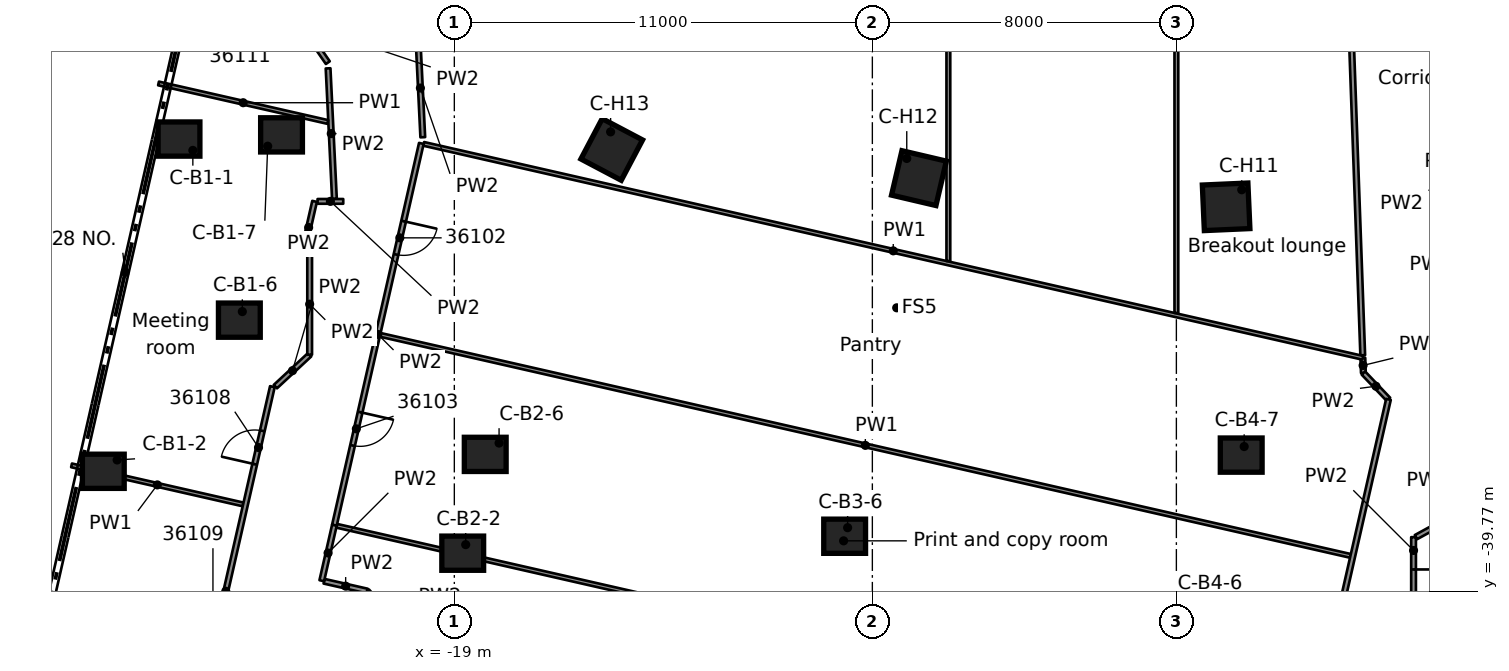
"""IFC4 building model, lengths in metres.
Left out: names, types, materials, properties, quantities, classifications, styles, units other than length and angle.
Written with IfcOpenShell. Run it as: python <this file> out.ifc"""

import sys

from ifc_helpers import new_model, si_unit, direction, frame, frame_2d, origin, origin_2d, place, context, subcontext, project, spatial, rectangle, extrude, element, fill, save


model = new_model("IFC4")
c1 = context("Model", 3, precision=1e-05, world=origin(), true_north=direction((0.0, 1.0)))
c2 = subcontext(c1, "Body", "Model", "MODEL_VIEW")
j1 = project(units=[si_unit("LENGTHUNIT", "METRE"), si_unit("PLANEANGLEUNIT", "RADIAN")], contexts=[c1])
p1 = place(None, origin())
s1 = spatial("IfcSite", under=j1, at=p1, CompositionType="ELEMENT")
p2 = place(p1, origin())
s2 = spatial("IfcBuilding", under=s1, at=p2, CompositionType="ELEMENT")
p3 = place(p2, frame((0.0, 0.0, 181.1)))
s3 = spatial("IfcBuildingStorey", under=s2, at=p3, CompositionType="ELEMENT", Elevation=181.1)
for number, where, z_axis, x_axis in (
    (1, (-26.245, -27.867, 0.0), (0.0, 0.0, 1.0), (1.0, 0.0, 0.0)),
    (2, (-28.237, -36.609, 0.0), (0.0, 0.0, 1.0), (1.0, 0.0, 0.0)),
    (3, (-24.657, -32.632, 0.0), (0.0, 0.0, 1.0), (1.0, 0.0, 0.0)),
    (4, (-23.547, -27.757, 0.0), (0.0, 0.0, 1.0), (1.0, 0.0, 0.0)),
    (5, (-18.779, -38.764, 0.0), (0.0, 0.0, 1.0), (1.0, 0.0, 0.0)),
    (6, (-18.187, -36.164, 0.0), (0.0, 0.0, 1.0), (1.0, 0.0, 0.0)),
    (7, (-8.729, -38.318, 0.0), (0.0, 0.0, 1.0), (1.0, 0.0, 0.0)),
    (8, (1.706, -36.183, 0.0), (0.0, 0.0, 1.0), (1.0, 0.0, 0.0)),
):
    element("IfcColumn", number, at=place(p3, frame(where, z_axis=z_axis, x_axis=x_axis)), inside=s3, PredefinedType="COLUMN", context=c2, shape_type="SweptSolid", body=[
        extrude(rectangle(XDim=1.1, YDim=0.9, at=origin_2d()), origin(), (0.0, 0.0, 1.0), 3.5),
    ])
for number, where, z_axis, x_axis in (
    (9, (1.309, -29.65, 0.0), (0.0, 0.0, 1.0), (0.044, -0.999, 0.0)),
    (10, (-6.774, -28.895, 0.0), (0.0, 0.0, 1.0), (-0.228, -0.974, 0.0)),
    (11, (-14.858, -28.141, 0.0), (0.0, 0.0, 1.0), (-0.467, -0.884, 0.0)),
):
    element("IfcColumn", number, at=place(p3, frame(where, z_axis=z_axis, x_axis=x_axis)), inside=s3, PredefinedType="COLUMN", context=c2, shape_type="SweptSolid", body=[
        extrude(rectangle(XDim=1.2, YDim=1.2, at=origin_2d()), origin(), (0.0, 0.0, 1.0), 3.5),
    ])
p4 = place(p3, frame((4.907, -33.623, 0.0), z_axis=(0.0, 0.0, 1.0), x_axis=(0.034692866757, -0.999398021309, 0.0)))
e12 = element("IfcWall", 12, at=p4, inside=s3, PredefinedType="PARTITIONING", context=c2, shape_type="SweptSolid", body=[
    extrude(rectangle(XDim=0.401, YDim=0.125, at=frame_2d((0.201, 0.0))), origin(), (0.0, 0.0, 1.0), 3.06),
])
p5 = place(p3, frame((4.904, -33.555, 0.0), z_axis=(0.0, 0.0, 1.0), x_axis=(-0.035916720211, 0.999354786454, 0.0)))
e13 = element("IfcWall", 13, at=p5, inside=s3, PredefinedType="PARTITIONING", context=c2, shape_type="SweptSolid", body=[
    extrude(rectangle(XDim=17.904, YDim=0.125, at=frame_2d((8.952, 0.0))), origin(), (0.0, 0.0, 1.0), 2.425),
])
p6 = place(p5, frame((10.623, 0.0, 0.0)))
e14 = element("IfcOpeningElement", 14, at=p6, cuts=e13, PredefinedType="OPENING", context=c2, shape_type="SweptSolid", body=[
    extrude(rectangle(XDim=1.1, YDim=2.1, at=frame_2d((0.55, 1.05))), frame((0.0, 0.073, 0.0), z_axis=(0.0, -1.0, 0.0), x_axis=(1.0, 0.0, 0.0)), (0.0, 0.0, 1.0), 0.145),
])
p7 = place(p3, frame((-22.322, -26.007, 0.0), z_axis=(0.0, 0.0, 1.0), x_axis=(0.048573949442, -0.998819589033, 0.0)))
e15 = element("IfcWall", 15, at=p7, inside=s3, PredefinedType="PARTITIONING", context=c2, shape_type="SweptSolid", body=[
    extrude(rectangle(XDim=3.438, YDim=0.125, at=frame_2d((1.719, 0.0))), origin(), (0.0, 0.0, 1.0), 3.06),
])
p8 = place(p3, frame((-19.956, -25.231, 0.0), z_axis=(0.0, 0.0, 1.0), x_axis=(0.048617095064, -0.998817489869, 0.0)))
e16 = element("IfcWall", 16, at=p8, inside=s3, PredefinedType="PARTITIONING", context=c2, shape_type="SweptSolid", body=[
    extrude(rectangle(XDim=2.591, YDim=0.125, at=frame_2d((1.296, 0.0))), origin(), (0.0, 0.0, 1.0), 3.06),
])
p9 = place(p3, frame((-22.329, -25.857, 0.0), z_axis=(0.0, 0.0, 1.0), x_axis=(-0.567945710046, 0.823066018276, 0.0)))
e17 = element("IfcWall", 17, at=p9, inside=s3, PredefinedType="PARTITIONING", context=c2, shape_type="SweptSolid", body=[
    extrude(rectangle(XDim=4.21, YDim=0.125, at=frame_2d((2.105, 0.0))), origin(), (0.0, 0.0, 1.0), 3.06),
])
p10 = place(p9, frame((1.85, 0.0, 0.0)))
e18 = element("IfcOpeningElement", 18, at=p10, cuts=e17, PredefinedType="OPENING", context=c2, shape_type="SweptSolid", body=[
    extrude(rectangle(XDim=0.9, YDim=2.1, at=frame_2d((0.45, 1.05))), frame((0.0, 0.073, 0.0), z_axis=(0.0, -1.0, 0.0), x_axis=(1.0, 0.0, 0.0)), (0.0, 0.0, 1.0), 0.145),
])
p11 = place(p3, frame((-22.427, -39.502, 0.0), z_axis=(0.0, 0.0, 1.0), x_axis=(0.97511430892, -0.221702694026, 0.0)))
e19 = element("IfcWall", 19, at=p11, inside=s3, PredefinedType="PARTITIONING", context=c2, shape_type="SweptSolid", body=[
    extrude(rectangle(XDim=1.164, YDim=0.125, at=frame_2d((0.582, 0.0))), origin(), (0.0, 0.0, 1.0), 3.06),
])
p12 = place(p3, frame((-29.073, -36.453, 0.0), z_axis=(0.0, 0.0, 1.0), x_axis=(0.975041099452, -0.222024445455, 0.0)))
e20 = element("IfcWall", 20, at=p12, inside=s3, PredefinedType="PARTITIONING", context=c2, shape_type="SweptSolid", body=[
    extrude(rectangle(XDim=4.63, YDim=0.1, at=frame_2d((2.315, 0.0))), origin(), (0.0, 0.0, 1.0), 3.06),
])
p13 = place(p3, frame((-22.095, -38.043, 0.0), z_axis=(0.0, 0.0, 1.0), x_axis=(0.975023843859, -0.222100211404, 0.0)))
e21 = element("IfcWall", 21, at=p13, inside=s3, PredefinedType="PARTITIONING", context=c2, shape_type="SweptSolid", body=[
    extrude(rectangle(XDim=26.186, YDim=0.1, at=frame_2d((13.093, 0.0))), origin(), (0.0, 0.0, 1.0), 2.425),
])
p14 = place(p3, frame((-20.951, -33.019, 0.0), z_axis=(0.0, 0.0, 1.0), x_axis=(0.975025683381, -0.222092135715, 0.0)))
e22 = element("IfcWall", 22, at=p14, inside=s3, PredefinedType="PARTITIONING", context=c2, shape_type="SweptSolid", body=[
    extrude(rectangle(XDim=26.187, YDim=0.1, at=frame_2d((13.094, 0.0))), origin(), (0.0, 0.0, 1.0), 3.06),
])
p15 = place(p3, frame((-26.784, -26.404, 0.0), z_axis=(0.0, 0.0, 1.0), x_axis=(0.975064044209, -0.221923657346, 0.0)))
e23 = element("IfcWall", 23, at=p15, inside=s3, PredefinedType="PARTITIONING", context=c2, shape_type="SweptSolid", body=[
    extrude(rectangle(XDim=4.569, YDim=0.1, at=frame_2d((2.284, 0.0))), origin(), (0.0, 0.0, 1.0), 3.06),
])
p16 = place(p3, frame((-19.806, -27.994, 0.0), z_axis=(0.0, 0.0, 1.0), x_axis=(0.975023541408, -0.222101539165, 0.0)))
e24 = element("IfcWall", 24, at=p16, inside=s3, PredefinedType="PARTITIONING", context=c2, shape_type="SweptSolid", body=[
    extrude(rectangle(XDim=25.345, YDim=0.1, at=frame_2d((12.672, 0.0))), origin(), (0.0, 0.0, 1.0), 3.06),
])
p17 = place(p3, frame((6.303, -38.342, 0.0), z_axis=(0.0, 0.0, 1.0), x_axis=(0.877434318746, 0.479696796202, 0.0)))
e25 = element("IfcWall", 25, at=p17, inside=s3, PredefinedType="PARTITIONING", context=c2, shape_type="SweptSolid", body=[
    extrude(rectangle(XDim=1.195, YDim=0.125, at=frame_2d((0.597, 0.0))), origin(), (0.0, 0.0, 1.0), 3.06),
])
p18 = place(p3, frame((-23.709, -34.381, 0.0), z_axis=(0.0, 0.0, 1.0), x_axis=(0.732207421562, 0.681081707147, 0.0)))
e26 = element("IfcWall", 26, at=p18, inside=s3, PredefinedType="PARTITIONING", context=c2, shape_type="SweptSolid", body=[
    extrude(rectangle(XDim=1.232, YDim=0.125, at=frame_2d((0.616, 0.0))), origin(), (0.0, 0.0, 1.0), 3.06),
])
p19 = place(p3, frame((-22.599, -29.507, 0.0), z_axis=(0.0, 0.0, 1.0), x_axis=(1.0, 0.0, 0.0)))
e27 = element("IfcWall", 27, at=p19, inside=s3, PredefinedType="PARTITIONING", context=c2, shape_type="SweptSolid", body=[
    extrude(rectangle(XDim=0.676, YDim=0.125, at=frame_2d((0.338, 0.0))), origin(), (0.0, 0.0, 1.0), 3.06),
])
p20 = place(p3, frame((4.922, -34.024, 0.0), z_axis=(0.0, 0.0, 1.0), x_axis=(0.689011074604, -0.724750811709, 0.0)))
e28 = element("IfcWall", 28, at=p20, inside=s3, PredefinedType="PARTITIONING", context=c2, shape_type="SweptSolid", body=[
    extrude(rectangle(XDim=0.956, YDim=0.125, at=frame_2d((0.478, 0.0))), origin(), (0.0, 0.0, 1.0), 3.06),
])
p21 = place(p3, frame((3.166, -45.332, 0.0), z_axis=(0.0, 0.0, 1.0), x_axis=(0.221843071865, 0.975082381887, 0.0)))
e29 = element("IfcWall", 29, at=p21, inside=s3, PredefinedType="PARTITIONING", context=c2, shape_type="SweptSolid", body=[
    extrude(rectangle(XDim=10.886, YDim=0.125, at=frame_2d((5.443, 0.0))), origin(), (0.0, 0.0, 1.0), 2.425),
])
p22 = place(p3, frame((-19.868, -27.982, 0.0), z_axis=(0.0, 0.0, 1.0), x_axis=(-0.222050161604, -0.975035243328, 0.0)))
e30 = element("IfcWall", 30, at=p22, inside=s3, PredefinedType="PARTITIONING", context=c2, shape_type="SweptSolid", body=[
    extrude(rectangle(XDim=10.304, YDim=0.125, at=frame_2d((5.152, 0.0))), origin(), (0.0, 0.0, 1.0), 3.06),
])
p23 = place(p22, frame((2.098, 0.0, 0.0)))
e31 = element("IfcOpeningElement", 31, at=p23, cuts=e30, PredefinedType="OPENING", context=c2, shape_type="SweptSolid", body=[
    extrude(rectangle(XDim=0.9, YDim=2.1, at=frame_2d((0.45, 1.05))), frame((0.0, 0.073, 0.0), z_axis=(0.0, -1.0, 0.0), x_axis=(1.0, 0.0, 0.0)), (0.0, 0.0, 1.0), 0.145),
])
p24 = place(p22, frame((7.252, 0.0, 0.0)))
e32 = element("IfcOpeningElement", 32, at=p24, cuts=e30, PredefinedType="OPENING", context=c2, shape_type="SweptSolid", body=[
    extrude(rectangle(XDim=0.9, YDim=2.1, at=frame_2d((0.45, 1.05))), frame((0.0, 0.073, 0.0), z_axis=(0.0, -1.0, 0.0), x_axis=(1.0, 0.0, 0.0)), (0.0, 0.0, 1.0), 0.145),
])
p25 = place(p3, frame((-22.488, -39.488, 0.0), z_axis=(0.0, 0.0, 1.0), x_axis=(0.221903185503, 0.975068703356, 0.0)))
e33 = element("IfcWall", 33, at=p25, inside=s3, PredefinedType="PARTITIONING", context=c2, shape_type="SweptSolid", body=[
    extrude(rectangle(XDim=1.496, YDim=0.125, at=frame_2d((0.748, 0.0))), origin(), (0.0, 0.0, 1.0), 3.06),
])
p26 = place(p3, frame((-26.24, -45.148, 0.0), z_axis=(0.0, 0.0, 1.0), x_axis=(0.22206165199, 0.975032626488, 0.0)))
e34 = element("IfcWall", 34, at=p26, inside=s3, PredefinedType="PARTITIONING", context=c2, shape_type="SweptSolid", body=[
    extrude(rectangle(XDim=11.042, YDim=0.125, at=frame_2d((5.521, 0.0))), origin(), (0.0, 0.0, 1.0), 3.06),
])
p27 = place(p26, frame((8.949, 0.0, 0.0)))
e35 = element("IfcOpeningElement", 35, at=p27, cuts=e34, PredefinedType="OPENING", context=c2, shape_type="SweptSolid", body=[
    extrude(rectangle(XDim=0.9, YDim=2.1, at=frame_2d((0.45, 1.05))), frame((0.0, 0.073, 0.0), z_axis=(0.0, -1.0, 0.0), x_axis=(1.0, 0.0, 0.0)), (0.0, 0.0, 1.0), 0.145),
])
p28 = place(p26, frame((3.1, 0.0, 0.0)))
e36 = element("IfcOpeningElement", 36, at=p28, cuts=e34, PredefinedType="OPENING", context=c2, shape_type="SweptSolid", body=[
    extrude(rectangle(XDim=1.8, YDim=2.1, at=frame_2d((0.9, 1.05))), frame((0.0, 0.073, 0.0), z_axis=(0.0, -1.0, 0.0), x_axis=(1.0, 0.0, 0.0)), (0.0, 0.0, 1.0), 0.145),
])
p29 = place(p3, frame((-22.99, -30.882, 0.0), z_axis=(0.0, 0.0, 1.0), x_axis=(0.221950340639, 0.975057970733, 0.0)))
e37 = element("IfcWall", 37, at=p29, inside=s3, PredefinedType="PARTITIONING", context=c2, shape_type="SweptSolid", body=[
    extrude(rectangle(XDim=1.41, YDim=0.125, at=frame_2d((0.705, 0.0))), origin(), (0.0, 0.0, 1.0), 3.06),
])
p30 = place(p3, frame((6.241, -38.342, 0.0), z_axis=(0.0, 0.0, 1.0), x_axis=(0.0, -1.0, 0.0)))
e38 = element("IfcWall", 38, at=p30, inside=s3, PredefinedType="PARTITIONING", context=c2, shape_type="SweptSolid", body=[
    extrude(rectangle(XDim=3.499, YDim=0.125, at=frame_2d((1.75, 0.0))), origin(), (0.0, 0.0, 1.0), 3.06),
])
p31 = place(p30, frame((0.85, 0.0, 0.0)))
e39 = element("IfcOpeningElement", 39, at=p31, cuts=e38, PredefinedType="OPENING", context=c2, shape_type="SweptSolid", body=[
    extrude(rectangle(XDim=1.8, YDim=2.1, at=frame_2d((0.9, 1.05))), frame((0.0, 0.073, 0.0), z_axis=(0.0, -1.0, 0.0), x_axis=(1.0, 0.0, 0.0)), (0.0, 0.0, 1.0), 0.145),
])
p32 = place(p3, frame((0.0, -32.442, 0.0), z_axis=(0.0, 0.0, 1.0), x_axis=(0.0, 1.0, 0.0)))
e40 = element("IfcWall", 40, at=p32, inside=s3, PredefinedType="PARTITIONING", context=c2, shape_type="SweptSolid", body=[
    extrude(rectangle(XDim=16.78, YDim=0.1, at=frame_2d((8.39, 0.0))), origin(), (0.0, 0.0, 1.0), 3.06),
])
p33 = place(p3, frame((-6.0, -31.076, 0.0), z_axis=(0.0, 0.0, 1.0), x_axis=(0.0, 1.0, 0.0)))
e41 = element("IfcWall", 41, at=p33, inside=s3, PredefinedType="PARTITIONING", context=c2, shape_type="SweptSolid", body=[
    extrude(rectangle(XDim=15.414, YDim=0.1, at=frame_2d((7.707, 0.0))), origin(), (0.0, 0.0, 1.0), 3.06),
])
p34 = place(p3, frame((-20.629, -40.513, 0.0), z_axis=(0.0, 0.0, 1.0), x_axis=(-0.660913097692, 0.750462442298, 0.0)))
e42 = element("IfcWall", 42, at=p34, inside=s3, PredefinedType="PARTITIONING", context=c2, shape_type="SweptSolid", body=[
    extrude(rectangle(XDim=1.003, YDim=0.125, at=frame_2d((0.501, 0.0))), origin(), (0.0, 0.0, 1.0), 3.06),
])
p35 = place(p3, frame((-22.807, -33.542, 0.0), z_axis=(0.0, 0.0, 1.0), x_axis=(0.0, 1.0, 0.0)))
e43 = element("IfcWall", 43, at=p35, inside=s3, PredefinedType="PARTITIONING", context=c2, shape_type="SweptSolid", body=[
    extrude(rectangle(XDim=2.66, YDim=0.125, at=frame_2d((1.33, 0.0))), origin(), (0.0, 0.0, 1.0), 3.06),
])
p36 = place(p31, origin())
e44 = element("IfcDoor", 44, at=p36, inside=s3, OperationType="DOUBLE_DOOR_SINGLE_SWING", PredefinedType="DOOR", context=c2, shape_type="SweptSolid", body=[
    extrude(rectangle(XDim=1.8, YDim=2.1, at=frame_2d((0.9, 1.05))), frame((0.0, 0.025, 0.0), z_axis=(0.0, -1.0, 0.0), x_axis=(1.0, 0.0, 0.0)), (0.0, 0.0, 1.0), 0.05),
])
fill(e39, e44)
p37 = place(p23, origin())
e45 = element("IfcDoor", 45, at=p37, inside=s3, OperationType="SINGLE_SWING_LEFT", PredefinedType="DOOR", context=c2, shape_type="SweptSolid", body=[
    extrude(rectangle(XDim=0.9, YDim=2.1, at=frame_2d((0.45, 1.05))), frame((0.0, 0.025, 0.0), z_axis=(0.0, -1.0, 0.0), x_axis=(1.0, 0.0, 0.0)), (0.0, 0.0, 1.0), 0.05),
])
fill(e31, e45)
p38 = place(p24, origin())
e46 = element("IfcDoor", 46, at=p38, inside=s3, OperationType="SINGLE_SWING_RIGHT", PredefinedType="DOOR", context=c2, shape_type="SweptSolid", body=[
    extrude(rectangle(XDim=0.9, YDim=2.1, at=frame_2d((0.45, 1.05))), frame((0.0, 0.025, 0.0), z_axis=(0.0, -1.0, 0.0), x_axis=(1.0, 0.0, 0.0)), (0.0, 0.0, 1.0), 0.05),
])
fill(e32, e46)
p39 = place(p27, origin())
e47 = element("IfcDoor", 47, at=p39, inside=s3, OperationType="SINGLE_SWING_RIGHT", PredefinedType="DOOR", context=c2, shape_type="SweptSolid", body=[
    extrude(rectangle(XDim=0.9, YDim=2.1, at=frame_2d((0.45, 1.05))), frame((0.0, 0.025, 0.0), z_axis=(0.0, -1.0, 0.0), x_axis=(1.0, 0.0, 0.0)), (0.0, 0.0, 1.0), 0.05),
])
fill(e35, e47)
save(model, sys.argv[1])
